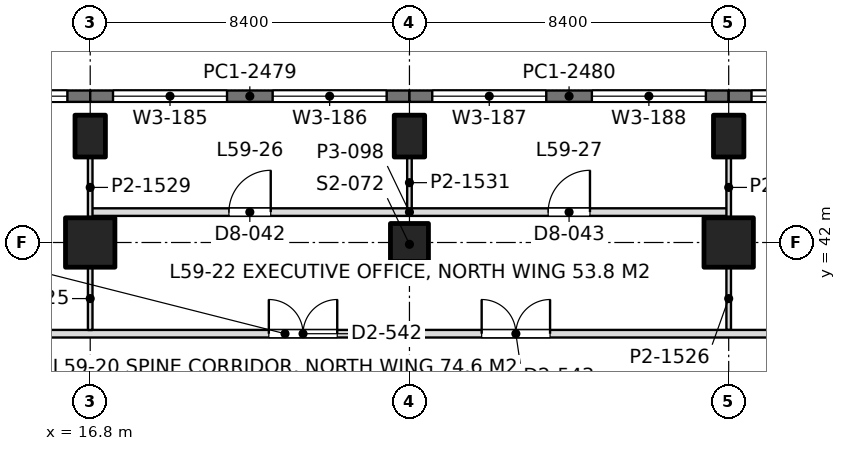
"""IFC4 building model, lengths in metres.
Left out: names, types, materials, properties, quantities, classifications, styles, units other than length and angle.
Written with IfcOpenShell. Run it as: python <this file> out.ifc"""

import sys

from ifc_helpers import new_model, si_unit, direction, frame, frame_2d, origin, origin_2d, place, context, subcontext, project, spatial, rectangle, extrude, element, fill, save


model = new_model("IFC4")
c1 = context("Model", 3, precision=1e-05, world=origin(), true_north=direction((0.0, 1.0)))
c2 = subcontext(c1, "Body", "Model", "MODEL_VIEW")
j1 = project(units=[si_unit("LENGTHUNIT", "METRE"), si_unit("PLANEANGLEUNIT", "RADIAN")], contexts=[c1])
p1 = place(None, origin())
s1 = spatial("IfcSite", under=j1, at=p1, CompositionType="ELEMENT")
p2 = place(p1, origin())
s2 = spatial("IfcBuilding", under=s1, at=p2, CompositionType="ELEMENT")
p3 = place(p2, frame((0.0, 0.0, 259.2)))
s3 = spatial("IfcBuildingStorey", under=s2, at=p3, CompositionType="ELEMENT", Elevation=259.2)
p4 = place(p3, frame((16.8, 42.0, 0.0), z_axis=(0.0, 0.0, 1.0), x_axis=(1.0, 0.0, 0.0)))
e1 = element("IfcColumn", 1, at=p4, inside=s3, PredefinedType="COLUMN", context=c2, shape_type="SweptSolid", body=[
    extrude(rectangle(XDim=1.3, YDim=1.3, at=origin_2d()), origin(), (0.0, 0.0, 1.0), 4.5),
])
p5 = place(p3, frame((16.8, 44.8, 0.0), z_axis=(0.0, 0.0, 1.0), x_axis=(1.0, 0.0, 0.0)))
e2 = element("IfcColumn", 2, at=p5, inside=s3, PredefinedType="COLUMN", context=c2, shape_type="SweptSolid", body=[
    extrude(rectangle(XDim=0.8, YDim=1.1, at=origin_2d()), origin(), (0.0, 0.0, 1.0), 4.5),
])
p6 = place(p3, frame((25.2, 42.0, 0.0), z_axis=(0.0, 0.0, 1.0), x_axis=(1.0, 0.0, 0.0)))
e3 = element("IfcColumn", 3, at=p6, inside=s3, PredefinedType="COLUMN", context=c2, shape_type="SweptSolid", body=[
    extrude(rectangle(XDim=1.0, YDim=1.0, at=origin_2d()), origin(), (0.0, 0.0, 1.0), 4.5),
])
p7 = place(p3, frame((25.2, 44.8, 0.0), z_axis=(0.0, 0.0, 1.0), x_axis=(1.0, 0.0, 0.0)))
e4 = element("IfcColumn", 4, at=p7, inside=s3, PredefinedType="COLUMN", context=c2, shape_type="SweptSolid", body=[
    extrude(rectangle(XDim=0.8, YDim=1.1, at=origin_2d()), origin(), (0.0, 0.0, 1.0), 4.5),
])
p8 = place(p3, frame((33.6, 42.0, 0.0), z_axis=(0.0, 0.0, 1.0), x_axis=(1.0, 0.0, 0.0)))
e5 = element("IfcColumn", 5, at=p8, inside=s3, PredefinedType="COLUMN", context=c2, shape_type="SweptSolid", body=[
    extrude(rectangle(XDim=1.3, YDim=1.3, at=origin_2d()), origin(), (0.0, 0.0, 1.0), 4.5),
])
p9 = place(p3, frame((33.6, 44.8, 0.0), z_axis=(0.0, 0.0, 1.0), x_axis=(1.0, 0.0, 0.0)))
e6 = element("IfcColumn", 6, at=p9, inside=s3, PredefinedType="COLUMN", context=c2, shape_type="SweptSolid", body=[
    extrude(rectangle(XDim=0.8, YDim=1.1, at=origin_2d()), origin(), (0.0, 0.0, 1.0), 4.5),
])
p10 = place(p3, frame((8.4, 45.85, 0.0), z_axis=(0.0, 0.0, 1.0), x_axis=(1.0, 0.0, 0.0)))
e7 = element("IfcWall", 7, at=p10, inside=s3, PredefinedType="SOLIDWALL", context=c2, shape_type="SweptSolid", body=[
    extrude(rectangle(XDim=8.4, YDim=0.3, at=frame_2d((4.2, 0.0))), origin(), (0.0, 0.0, 1.0), 4.35),
])
p11 = place(p10, frame((0.6, 0.0, 0.9)))
e8 = element("IfcOpeningElement", 8, at=p11, cuts=e7, PredefinedType="OPENING", context=c2, shape_type="SweptSolid", body=[
    extrude(rectangle(XDim=3.0, YDim=2.4, at=frame_2d((1.5, 1.2))), frame((0.0, 0.16, 0.0), z_axis=(0.0, -1.0, 0.0), x_axis=(1.0, 0.0, 0.0)), (0.0, 0.0, 1.0), 0.32),
])
p12 = place(p10, frame((4.8, 0.0, 0.9)))
e9 = element("IfcOpeningElement", 9, at=p12, cuts=e7, PredefinedType="OPENING", context=c2, shape_type="SweptSolid", body=[
    extrude(rectangle(XDim=3.0, YDim=2.4, at=frame_2d((1.5, 1.2))), frame((0.0, 0.16, 0.0), z_axis=(0.0, -1.0, 0.0), x_axis=(1.0, 0.0, 0.0)), (0.0, 0.0, 1.0), 0.32),
])
p13 = place(p3, frame((16.8, 45.85, 0.0), z_axis=(0.0, 0.0, 1.0), x_axis=(1.0, 0.0, 0.0)))
e10 = element("IfcWall", 10, at=p13, inside=s3, PredefinedType="SOLIDWALL", context=c2, shape_type="SweptSolid", body=[
    extrude(rectangle(XDim=8.4, YDim=0.3, at=frame_2d((4.2, 0.0))), origin(), (0.0, 0.0, 1.0), 4.35),
])
p14 = place(p13, frame((0.6, 0.0, 0.9)))
e11 = element("IfcOpeningElement", 11, at=p14, cuts=e10, PredefinedType="OPENING", context=c2, shape_type="SweptSolid", body=[
    extrude(rectangle(XDim=3.0, YDim=2.4, at=frame_2d((1.5, 1.2))), frame((0.0, 0.16, 0.0), z_axis=(0.0, -1.0, 0.0), x_axis=(1.0, 0.0, 0.0)), (0.0, 0.0, 1.0), 0.32),
])
p15 = place(p13, frame((4.8, 0.0, 0.9)))
e12 = element("IfcOpeningElement", 12, at=p15, cuts=e10, PredefinedType="OPENING", context=c2, shape_type="SweptSolid", body=[
    extrude(rectangle(XDim=3.0, YDim=2.4, at=frame_2d((1.5, 1.2))), frame((0.0, 0.16, 0.0), z_axis=(0.0, -1.0, 0.0), x_axis=(1.0, 0.0, 0.0)), (0.0, 0.0, 1.0), 0.32),
])
p16 = place(p3, frame((25.2, 45.85, 0.0), z_axis=(0.0, 0.0, 1.0), x_axis=(1.0, 0.0, 0.0)))
e13 = element("IfcWall", 13, at=p16, inside=s3, PredefinedType="SOLIDWALL", context=c2, shape_type="SweptSolid", body=[
    extrude(rectangle(XDim=8.4, YDim=0.3, at=frame_2d((4.2, 0.0))), origin(), (0.0, 0.0, 1.0), 4.35),
])
p17 = place(p16, frame((0.6, 0.0, 0.9)))
e14 = element("IfcOpeningElement", 14, at=p17, cuts=e13, PredefinedType="OPENING", context=c2, shape_type="SweptSolid", body=[
    extrude(rectangle(XDim=3.0, YDim=2.4, at=frame_2d((1.5, 1.2))), frame((0.0, 0.16, 0.0), z_axis=(0.0, -1.0, 0.0), x_axis=(1.0, 0.0, 0.0)), (0.0, 0.0, 1.0), 0.32),
])
p18 = place(p16, frame((4.8, 0.0, 0.9)))
e15 = element("IfcOpeningElement", 15, at=p18, cuts=e13, PredefinedType="OPENING", context=c2, shape_type="SweptSolid", body=[
    extrude(rectangle(XDim=3.0, YDim=2.4, at=frame_2d((1.5, 1.2))), frame((0.0, 0.16, 0.0), z_axis=(0.0, -1.0, 0.0), x_axis=(1.0, 0.0, 0.0)), (0.0, 0.0, 1.0), 0.32),
])
p19 = place(p3, frame((33.6, 45.85, 0.0), z_axis=(0.0, 0.0, 1.0), x_axis=(1.0, 0.0, 0.0)))
e16 = element("IfcWall", 16, at=p19, inside=s3, PredefinedType="SOLIDWALL", context=c2, shape_type="SweptSolid", body=[
    extrude(rectangle(XDim=8.4, YDim=0.3, at=frame_2d((4.2, 0.0))), origin(), (0.0, 0.0, 1.0), 4.35),
])
p20 = place(p19, frame((0.6, 0.0, 0.9)))
e17 = element("IfcOpeningElement", 17, at=p20, cuts=e16, PredefinedType="OPENING", context=c2, shape_type="SweptSolid", body=[
    extrude(rectangle(XDim=3.0, YDim=2.4, at=frame_2d((1.5, 1.2))), frame((0.0, 0.16, 0.0), z_axis=(0.0, -1.0, 0.0), x_axis=(1.0, 0.0, 0.0)), (0.0, 0.0, 1.0), 0.32),
])
p21 = place(p19, frame((4.8, 0.0, 0.9)))
e18 = element("IfcOpeningElement", 18, at=p21, cuts=e16, PredefinedType="OPENING", context=c2, shape_type="SweptSolid", body=[
    extrude(rectangle(XDim=3.0, YDim=2.4, at=frame_2d((1.5, 1.2))), frame((0.0, 0.16, 0.0), z_axis=(0.0, -1.0, 0.0), x_axis=(1.0, 0.0, 0.0)), (0.0, 0.0, 1.0), 0.32),
])
p22 = place(p3, frame((16.8, 42.8, 0.0), z_axis=(0.0, 0.0, 1.0), x_axis=(1.0, 0.0, 0.0)))
e19 = element("IfcWall", 19, at=p22, inside=s3, PredefinedType="PARTITIONING", context=c2, shape_type="SweptSolid", body=[
    extrude(rectangle(XDim=16.8, YDim=0.2, at=frame_2d((8.4, 0.0))), origin(), (0.0, 0.0, 1.0), 3.99),
])
p23 = place(p22, frame((3.65, 0.0, 0.0)))
e20 = element("IfcOpeningElement", 20, at=p23, cuts=e19, PredefinedType="OPENING", context=c2, shape_type="SweptSolid", body=[
    extrude(rectangle(XDim=1.1, YDim=2.4, at=frame_2d((0.55, 1.2))), frame((0.0, 0.11, 0.0), z_axis=(0.0, -1.0, 0.0), x_axis=(1.0, 0.0, 0.0)), (0.0, 0.0, 1.0), 0.22),
])
p24 = place(p22, frame((12.05, 0.0, 0.0)))
e21 = element("IfcOpeningElement", 21, at=p24, cuts=e19, PredefinedType="OPENING", context=c2, shape_type="SweptSolid", body=[
    extrude(rectangle(XDim=1.1, YDim=2.4, at=frame_2d((0.55, 1.2))), frame((0.0, 0.11, 0.0), z_axis=(0.0, -1.0, 0.0), x_axis=(1.0, 0.0, 0.0)), (0.0, 0.0, 1.0), 0.22),
])
p25 = place(p3, frame((16.8, 42.648, 0.0), z_axis=(0.0, 0.0, 1.0), x_axis=(0.0, 1.0, 0.0)))
e22 = element("IfcWall", 22, at=p25, inside=s3, PredefinedType="PARTITIONING", context=c2, shape_type="SweptSolid", body=[
    extrude(rectangle(XDim=1.603, YDim=0.12, at=frame_2d((0.802, 0.0))), origin(), (0.0, 0.0, 1.0), 3.99),
])
p26 = place(p3, frame((25.2, 42.898, 0.0), z_axis=(0.0, 0.0, 1.0), x_axis=(0.0, 1.0, 0.0)))
e23 = element("IfcWall", 23, at=p26, inside=s3, PredefinedType="PARTITIONING", context=c2, shape_type="SweptSolid", body=[
    extrude(rectangle(XDim=1.353, YDim=0.12, at=frame_2d((0.677, 0.0))), origin(), (0.0, 0.0, 1.0), 3.99),
])
p27 = place(p3, frame((33.6, 42.648, 0.0), z_axis=(0.0, 0.0, 1.0), x_axis=(0.0, 1.0, 0.0)))
e24 = element("IfcWall", 24, at=p27, inside=s3, PredefinedType="PARTITIONING", context=c2, shape_type="SweptSolid", body=[
    extrude(rectangle(XDim=1.603, YDim=0.12, at=frame_2d((0.802, 0.0))), origin(), (0.0, 0.0, 1.0), 3.99),
])
for number, where, z_axis, x_axis in (
    (25, (16.8, 39.698, 0.0), (0.0, 0.0, 1.0), (0.0, 1.0, 0.0)),
    (26, (33.6, 39.698, 0.0), (0.0, 0.0, 1.0), (0.0, 1.0, 0.0)),
):
    element("IfcWall", number, at=place(p3, frame(where, z_axis=z_axis, x_axis=x_axis)), inside=s3, PredefinedType="PARTITIONING", context=c2, shape_type="SweptSolid", body=[
        extrude(rectangle(XDim=1.653, YDim=0.12, at=frame_2d((0.827, 0.0))), origin(), (0.0, 0.0, 1.0), 3.99),
    ])
p28 = place(p3, frame((1.2, 39.6, 0.0), z_axis=(0.0, 0.0, 1.0), x_axis=(1.0, 0.0, 0.0)))
e27 = element("IfcWall", 27, at=p28, inside=s3, PredefinedType="PARTITIONING", context=c2, shape_type="SweptSolid", body=[
    extrude(rectangle(XDim=41.452, YDim=0.2, at=frame_2d((20.726, 0.0))), origin(), (0.0, 0.0, 1.0), 3.8),
])
p29 = place(p28, frame((4.3, 0.0, 0.0)))
e28 = element("IfcOpeningElement", 28, at=p29, cuts=e27, PredefinedType="OPENING", context=c2, shape_type="SweptSolid", body=[
    extrude(rectangle(XDim=1.8, YDim=2.2, at=frame_2d((0.9, 1.1))), frame((0.0, 0.11, 0.0), z_axis=(0.0, -1.0, 0.0), x_axis=(1.0, 0.0, 0.0)), (0.0, 0.0, 1.0), 0.22),
])
p30 = place(p28, frame((9.5, 0.0, 0.0)))
e29 = element("IfcOpeningElement", 29, at=p30, cuts=e27, PredefinedType="OPENING", context=c2, shape_type="SweptSolid", body=[
    extrude(rectangle(XDim=1.8, YDim=2.2, at=frame_2d((0.9, 1.1))), frame((0.0, 0.11, 0.0), z_axis=(0.0, -1.0, 0.0), x_axis=(1.0, 0.0, 0.0)), (0.0, 0.0, 1.0), 0.22),
])
p31 = place(p28, frame((20.3, 0.0, 0.0)))
e30 = element("IfcOpeningElement", 30, at=p31, cuts=e27, PredefinedType="OPENING", context=c2, shape_type="SweptSolid", body=[
    extrude(rectangle(XDim=1.8, YDim=2.2, at=frame_2d((0.9, 1.1))), frame((0.0, 0.11, 0.0), z_axis=(0.0, -1.0, 0.0), x_axis=(1.0, 0.0, 0.0)), (0.0, 0.0, 1.0), 0.22),
])
p32 = place(p28, frame((25.9, 0.0, 0.0)))
e31 = element("IfcOpeningElement", 31, at=p32, cuts=e27, PredefinedType="OPENING", context=c2, shape_type="SweptSolid", body=[
    extrude(rectangle(XDim=1.8, YDim=2.2, at=frame_2d((0.9, 1.1))), frame((0.0, 0.11, 0.0), z_axis=(0.0, -1.0, 0.0), x_axis=(1.0, 0.0, 0.0)), (0.0, 0.0, 1.0), 0.22),
])
p33 = place(p28, frame((34.517, 0.0, 0.0)))
e32 = element("IfcOpeningElement", 32, at=p33, cuts=e27, PredefinedType="OPENING", context=c2, shape_type="SweptSolid", body=[
    extrude(rectangle(XDim=1.8, YDim=2.2, at=frame_2d((0.9, 1.1))), frame((0.0, 0.11, 0.0), z_axis=(0.0, -1.0, 0.0), x_axis=(1.0, 0.0, 0.0)), (0.0, 0.0, 1.0), 0.22),
])
p34 = place(p28, frame((37.533, 0.0, 0.0)))
e33 = element("IfcOpeningElement", 33, at=p34, cuts=e27, PredefinedType="OPENING", context=c2, shape_type="SweptSolid", body=[
    extrude(rectangle(XDim=1.8, YDim=2.2, at=frame_2d((0.9, 1.1))), frame((0.0, 0.11, 0.0), z_axis=(0.0, -1.0, 0.0), x_axis=(1.0, 0.0, 0.0)), (0.0, 0.0, 1.0), 0.22),
])
p35 = place(p12, origin())
e34 = element("IfcWindow", 34, at=p35, inside=s3, PartitioningType="SINGLE_PANEL", PredefinedType="WINDOW", context=c2, shape_type="SweptSolid", body=[
    extrude(rectangle(XDim=3.0, YDim=2.4, at=frame_2d((1.5, 1.2))), frame((0.0, 0.03, 0.0), z_axis=(0.0, -1.0, 0.0), x_axis=(1.0, 0.0, 0.0)), (0.0, 0.0, 1.0), 0.06),
])
fill(e9, e34)
p36 = place(p14, origin())
e35 = element("IfcWindow", 35, at=p36, inside=s3, PartitioningType="SINGLE_PANEL", PredefinedType="WINDOW", context=c2, shape_type="SweptSolid", body=[
    extrude(rectangle(XDim=3.0, YDim=2.4, at=frame_2d((1.5, 1.2))), frame((0.0, 0.03, 0.0), z_axis=(0.0, -1.0, 0.0), x_axis=(1.0, 0.0, 0.0)), (0.0, 0.0, 1.0), 0.06),
])
fill(e11, e35)
p37 = place(p15, origin())
e36 = element("IfcWindow", 36, at=p37, inside=s3, PartitioningType="SINGLE_PANEL", PredefinedType="WINDOW", context=c2, shape_type="SweptSolid", body=[
    extrude(rectangle(XDim=3.0, YDim=2.4, at=frame_2d((1.5, 1.2))), frame((0.0, 0.03, 0.0), z_axis=(0.0, -1.0, 0.0), x_axis=(1.0, 0.0, 0.0)), (0.0, 0.0, 1.0), 0.06),
])
fill(e12, e36)
p38 = place(p17, origin())
e37 = element("IfcWindow", 37, at=p38, inside=s3, PartitioningType="SINGLE_PANEL", PredefinedType="WINDOW", context=c2, shape_type="SweptSolid", body=[
    extrude(rectangle(XDim=3.0, YDim=2.4, at=frame_2d((1.5, 1.2))), frame((0.0, 0.03, 0.0), z_axis=(0.0, -1.0, 0.0), x_axis=(1.0, 0.0, 0.0)), (0.0, 0.0, 1.0), 0.06),
])
fill(e14, e37)
p39 = place(p18, origin())
e38 = element("IfcWindow", 38, at=p39, inside=s3, PartitioningType="SINGLE_PANEL", PredefinedType="WINDOW", context=c2, shape_type="SweptSolid", body=[
    extrude(rectangle(XDim=3.0, YDim=2.4, at=frame_2d((1.5, 1.2))), frame((0.0, 0.03, 0.0), z_axis=(0.0, -1.0, 0.0), x_axis=(1.0, 0.0, 0.0)), (0.0, 0.0, 1.0), 0.06),
])
fill(e15, e38)
p40 = place(p20, origin())
e39 = element("IfcWindow", 39, at=p40, inside=s3, PartitioningType="SINGLE_PANEL", PredefinedType="WINDOW", context=c2, shape_type="SweptSolid", body=[
    extrude(rectangle(XDim=3.0, YDim=2.4, at=frame_2d((1.5, 1.2))), frame((0.0, 0.03, 0.0), z_axis=(0.0, -1.0, 0.0), x_axis=(1.0, 0.0, 0.0)), (0.0, 0.0, 1.0), 0.06),
])
fill(e17, e39)
p41 = place(p23, origin())
e40 = element("IfcDoor", 40, at=p41, inside=s3, OperationType="SINGLE_SWING_RIGHT", PredefinedType="DOOR", context=c2, shape_type="SweptSolid", body=[
    extrude(rectangle(XDim=1.1, YDim=2.4, at=frame_2d((0.55, 1.2))), frame((0.0, 0.025, 0.0), z_axis=(0.0, -1.0, 0.0), x_axis=(1.0, 0.0, 0.0)), (0.0, 0.0, 1.0), 0.05),
])
fill(e20, e40)
p42 = place(p24, origin())
e41 = element("IfcDoor", 41, at=p42, inside=s3, OperationType="SINGLE_SWING_RIGHT", PredefinedType="DOOR", context=c2, shape_type="SweptSolid", body=[
    extrude(rectangle(XDim=1.1, YDim=2.4, at=frame_2d((0.55, 1.2))), frame((0.0, 0.025, 0.0), z_axis=(0.0, -1.0, 0.0), x_axis=(1.0, 0.0, 0.0)), (0.0, 0.0, 1.0), 0.05),
])
fill(e21, e41)
p43 = place(p31, origin())
e42 = element("IfcDoor", 42, at=p43, inside=s3, OperationType="DOUBLE_DOOR_SINGLE_SWING", PredefinedType="DOOR", context=c2, shape_type="SweptSolid", body=[
    extrude(rectangle(XDim=1.8, YDim=2.2, at=frame_2d((0.9, 1.1))), frame((0.0, 0.025, 0.0), z_axis=(0.0, -1.0, 0.0), x_axis=(1.0, 0.0, 0.0)), (0.0, 0.0, 1.0), 0.05),
])
fill(e30, e42)
p44 = place(p32, origin())
e43 = element("IfcDoor", 43, at=p44, inside=s3, OperationType="DOUBLE_DOOR_SINGLE_SWING", PredefinedType="DOOR", context=c2, shape_type="SweptSolid", body=[
    extrude(rectangle(XDim=1.8, YDim=2.2, at=frame_2d((0.9, 1.1))), frame((0.0, 0.025, 0.0), z_axis=(0.0, -1.0, 0.0), x_axis=(1.0, 0.0, 0.0)), (0.0, 0.0, 1.0), 0.05),
])
fill(e31, e43)
save(model, sys.argv[1])
